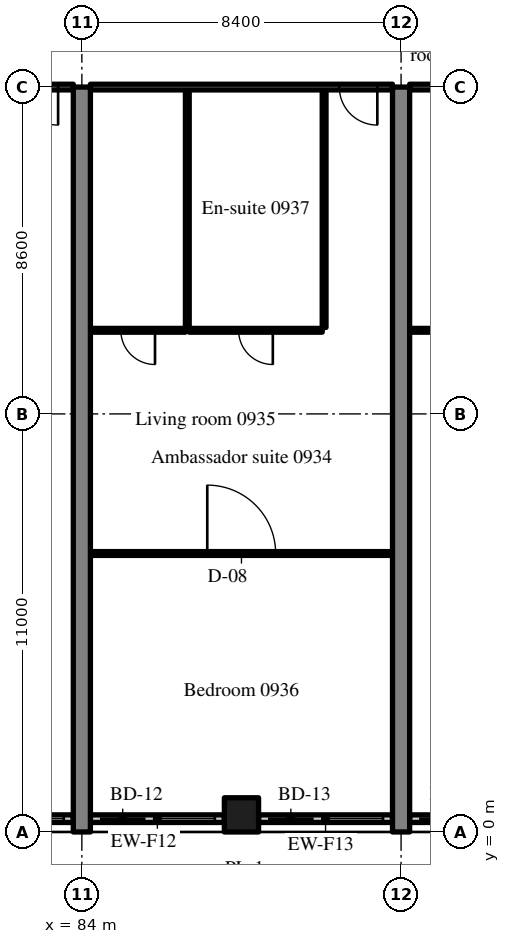
"""IFC4 building model, lengths in metres.
Left out: names, types, materials, properties, quantities, classifications, styles, units other than length and angle.
Written with IfcOpenShell. Run it as: python <this file> out.ifc"""

import sys

from ifc_helpers import new_model, si_unit, direction, frame, frame_2d, origin, origin_2d, place, context, subcontext, project, spatial, rectangle, extrude, source, transform, mapped, element, fill, save


model = new_model("IFC4")
c1 = context("Model", 3, precision=1e-05, world=origin(), true_north=direction((0.0, 1.0)))
c2 = subcontext(c1, "Body", "Model", "MODEL_VIEW")
j1 = project(units=[si_unit("LENGTHUNIT", "METRE"), si_unit("PLANEANGLEUNIT", "RADIAN")], contexts=[c1])
p1 = place(None, origin())
s1 = spatial("IfcSite", under=j1, at=p1, CompositionType="ELEMENT")
p2 = place(p1, origin())
s2 = spatial("IfcBuilding", under=s1, at=p2, CompositionType="ELEMENT")
p3 = place(p2, frame((0.0, 0.0, 43.0)))
s3 = spatial("IfcBuildingStorey", under=s2, at=p3, CompositionType="ELEMENT", Elevation=43.0)
m1 = source(origin(), c2, "Body", "SweptSolid", [
    extrude(rectangle(XDim=19.6, YDim=0.45, at=frame_2d((9.8, 0.0))), origin(), (0.0, 0.0, 1.0), 3.52),
])
for number, where, z_axis, x_axis in (
    (1, (84.0, 0.0, 0.0), (0.0, 0.0, 1.0), (0.0, 1.0, 0.0)),
    (2, (92.4, 0.0, 0.0), (0.0, 0.0, 1.0), (0.0, 1.0, 0.0)),
):
    element("IfcWall", number, at=place(p3, frame(where, z_axis=z_axis, x_axis=x_axis)), inside=s3, PredefinedType="SHEAR", context=c2, shape_type="MappedRepresentation", body=[
        mapped(m1, transform((0.0, 0.0, 0.0), scale=1.0)),
    ])
m2 = source(origin(), c2, "Body", "SweptSolid", [
    extrude(rectangle(XDim=0.9, YDim=0.9, at=origin_2d()), origin(), (0.0, 0.0, 1.0), 3.52),
])
p4 = place(p3, frame((88.2, 0.45, 0.0), z_axis=(0.0, 0.0, 1.0), x_axis=(1.0, 0.0, 0.0)))
e3 = element("IfcColumn", 3, at=p4, inside=s3, PredefinedType="COLUMN", context=c2, shape_type="MappedRepresentation", body=[
    mapped(m2, transform((0.0, 0.0, 0.0), scale=1.0)),
])
m3 = source(origin(), c2, "Body", "SweptSolid", [
    extrude(rectangle(XDim=3.525, YDim=0.2, at=frame_2d((1.762, 0.0))), origin(), (0.0, 0.0, 1.0), 2.82),
])
p5 = place(p3, frame((80.25, 0.35, 0.0), z_axis=(0.0, 0.0, 1.0), x_axis=(1.0, 0.0, 0.0)))
e4 = element("IfcWall", 4, at=p5, inside=s3, PredefinedType="SOLIDWALL", context=c2, shape_type="MappedRepresentation", body=[
    mapped(m3, transform((0.0, 0.0, 0.0), scale=1.0)),
])
m4 = source(origin(), c2, "Body", "SweptSolid", [
    extrude(rectangle(XDim=1.2, YDim=2.4, at=frame_2d((0.6, 1.2))), frame((0.0, 0.11, 0.0), z_axis=(0.0, -1.0, 0.0), x_axis=(1.0, 0.0, 0.0)), (0.0, 0.0, 1.0), 0.22),
])
p6 = place(p5, frame((0.25, 0.0, 0.0)))
e5 = element("IfcOpeningElement", 5, at=p6, cuts=e4, PredefinedType="OPENING", context=c2, shape_type="MappedRepresentation", body=[
    mapped(m4, transform((0.0, 0.0, 0.0), scale=1.0)),
])
m5 = source(origin(), c2, "Body", "SweptSolid", [
    extrude(rectangle(XDim=1.5, YDim=1.5, at=frame_2d((0.75, 0.75))), frame((0.0, 0.11, 0.0), z_axis=(0.0, -1.0, 0.0), x_axis=(1.0, 0.0, 0.0)), (0.0, 0.0, 1.0), 0.22),
])
p7 = place(p5, frame((1.775, 0.0, 0.9)))
e6 = element("IfcOpeningElement", 6, at=p7, cuts=e4, PredefinedType="OPENING", context=c2, shape_type="MappedRepresentation", body=[
    mapped(m5, transform((0.0, 0.0, 0.0), scale=1.0)),
])
p8 = place(p3, frame((84.225, 0.35, 0.0), z_axis=(0.0, 0.0, 1.0), x_axis=(1.0, 0.0, 0.0)))
e7 = element("IfcWall", 7, at=p8, inside=s3, PredefinedType="SOLIDWALL", context=c2, shape_type="MappedRepresentation", body=[
    mapped(m3, transform((0.0, 0.0, 0.0), scale=1.0)),
])
p9 = place(p8, frame((0.25, 0.0, 0.0)))
e8 = element("IfcOpeningElement", 8, at=p9, cuts=e7, PredefinedType="OPENING", context=c2, shape_type="MappedRepresentation", body=[
    mapped(m4, transform((0.0, 0.0, 0.0), scale=1.0)),
])
p10 = place(p8, frame((1.775, 0.0, 0.9)))
e9 = element("IfcOpeningElement", 9, at=p10, cuts=e7, PredefinedType="OPENING", context=c2, shape_type="MappedRepresentation", body=[
    mapped(m5, transform((0.0, 0.0, 0.0), scale=1.0)),
])
m6 = source(origin(), c2, "Body", "SweptSolid", [
    extrude(rectangle(XDim=3.525, YDim=0.2, at=frame_2d((1.763, 0.0))), origin(), (0.0, 0.0, 1.0), 2.82),
])
p11 = place(p3, frame((88.65, 0.35, 0.0), z_axis=(0.0, 0.0, 1.0), x_axis=(1.0, 0.0, 0.0)))
e10 = element("IfcWall", 10, at=p11, inside=s3, PredefinedType="SOLIDWALL", context=c2, shape_type="MappedRepresentation", body=[
    mapped(m6, transform((0.0, 0.0, 0.0), scale=1.0)),
])
p12 = place(p11, frame((0.25, 0.0, 0.0)))
e11 = element("IfcOpeningElement", 11, at=p12, cuts=e10, PredefinedType="OPENING", context=c2, shape_type="MappedRepresentation", body=[
    mapped(m4, transform((0.0, 0.0, 0.0), scale=1.0)),
])
p13 = place(p11, frame((1.775, 0.0, 0.9)))
e12 = element("IfcOpeningElement", 12, at=p13, cuts=e10, PredefinedType="OPENING", context=c2, shape_type="MappedRepresentation", body=[
    mapped(m5, transform((0.0, 0.0, 0.0), scale=1.0)),
])
m7 = source(origin(), c2, "Body", "SweptSolid", [
    extrude(rectangle(XDim=4.03, YDim=0.2, at=frame_2d((2.015, 0.0))), origin(), (0.0, 0.0, 1.0), 2.82),
])
p14 = place(p3, frame((92.625, 0.35, 0.0), z_axis=(0.0, 0.0, 1.0), x_axis=(1.0, 0.0, 0.0)))
e13 = element("IfcWall", 13, at=p14, inside=s3, PredefinedType="SOLIDWALL", context=c2, shape_type="MappedRepresentation", body=[
    mapped(m7, transform((0.0, 0.0, 0.0), scale=1.0)),
])
p15 = place(p14, frame((0.25, 0.0, 0.0)))
e14 = element("IfcOpeningElement", 14, at=p15, cuts=e13, PredefinedType="OPENING", context=c2, shape_type="MappedRepresentation", body=[
    mapped(m4, transform((0.0, 0.0, 0.0), scale=1.0)),
])
p16 = place(p14, frame((2.28, 0.0, 0.9)))
e15 = element("IfcOpeningElement", 15, at=p16, cuts=e13, PredefinedType="OPENING", context=c2, shape_type="MappedRepresentation", body=[
    mapped(m5, transform((0.0, 0.0, 0.0), scale=1.0)),
])
m8 = source(origin(), c2, "Body", "SweptSolid", [
    extrude(rectangle(XDim=3.9, YDim=0.15, at=frame_2d((1.95, 0.0))), origin(), (0.0, 0.0, 1.0), 2.82),
])
p17 = place(p3, frame((79.875, 19.6, 0.0), z_axis=(0.0, 0.0, 1.0), x_axis=(1.0, 0.0, 0.0)))
e16 = element("IfcWall", 16, at=p17, inside=s3, PredefinedType="PARTITIONING", context=c2, shape_type="MappedRepresentation", body=[
    mapped(m8, transform((0.0, 0.0, 0.0), scale=1.0)),
])
m9 = source(origin(), c2, "Body", "SweptSolid", [
    extrude(rectangle(XDim=1.0, YDim=2.1, at=frame_2d((0.5, 1.05))), frame((0.0, 0.085, 0.0), z_axis=(0.0, -1.0, 0.0), x_axis=(1.0, 0.0, 0.0)), (0.0, 0.0, 1.0), 0.17),
])
p18 = place(p17, frame((2.5, 0.0, 0.0)))
e17 = element("IfcOpeningElement", 17, at=p18, cuts=e16, PredefinedType="OPENING", context=c2, shape_type="MappedRepresentation", body=[
    mapped(m9, transform((0.0, 0.0, 0.0), scale=1.0)),
])
m10 = source(origin(), c2, "Body", "SweptSolid", [
    extrude(rectangle(XDim=6.25, YDim=0.1, at=frame_2d((3.125, 0.0))), origin(), (0.0, 0.0, 1.0), 3.52),
])
for number, where, z_axis, x_axis in (
    (18, (90.375, 13.275, 0.0), (0.0, 0.0, 1.0), (0.0, 1.0, 0.0)),
    (19, (86.775, 13.275, 0.0), (0.0, 0.0, 1.0), (0.0, 1.0, 0.0)),
):
    element("IfcWall", number, at=place(p3, frame(where, z_axis=z_axis, x_axis=x_axis)), inside=s3, PredefinedType="PARTITIONING", context=c2, shape_type="MappedRepresentation", body=[
        mapped(m10, transform((0.0, 0.0, 0.0), scale=1.0)),
    ])
m11 = source(origin(), c2, "Body", "SweptSolid", [
    extrude(rectangle(XDim=3.5, YDim=0.1, at=frame_2d((1.75, 0.0))), origin(), (0.0, 0.0, 1.0), 3.52),
])
p19 = place(p3, frame((86.825, 13.2, 0.0), z_axis=(0.0, 0.0, 1.0), x_axis=(1.0, 0.0, 0.0)))
e20 = element("IfcWall", 20, at=p19, inside=s3, PredefinedType="PARTITIONING", context=c2, shape_type="MappedRepresentation", body=[
    mapped(m11, transform((0.0, 0.0, 0.0), scale=1.0)),
])
m12 = source(origin(), c2, "Body", "SweptSolid", [
    extrude(rectangle(XDim=0.9, YDim=2.1, at=frame_2d((0.45, 1.05))), frame((0.0, 0.06, 0.0), z_axis=(0.0, -1.0, 0.0), x_axis=(1.0, 0.0, 0.0)), (0.0, 0.0, 1.0), 0.12),
])
p20 = place(p19, frame((1.3, 0.0, 0.0)))
e21 = element("IfcOpeningElement", 21, at=p20, cuts=e20, PredefinedType="OPENING", context=c2, shape_type="MappedRepresentation", body=[
    mapped(m12, transform((0.0, 0.0, 0.0), scale=1.0)),
])
m13 = source(origin(), c2, "Body", "SweptSolid", [
    extrude(rectangle(XDim=2.5, YDim=0.1, at=frame_2d((1.25, 0.0))), origin(), (0.0, 0.0, 1.0), 3.52),
])
p21 = place(p3, frame((84.225, 13.2, 0.0), z_axis=(0.0, 0.0, 1.0), x_axis=(1.0, 0.0, 0.0)))
e22 = element("IfcWall", 22, at=p21, inside=s3, PredefinedType="PARTITIONING", context=c2, shape_type="MappedRepresentation", body=[
    mapped(m13, transform((0.0, 0.0, 0.0), scale=1.0)),
])
p22 = place(p21, frame((0.8, 0.0, 0.0)))
e23 = element("IfcOpeningElement", 23, at=p22, cuts=e22, PredefinedType="OPENING", context=c2, shape_type="MappedRepresentation", body=[
    mapped(m12, transform((0.0, 0.0, 0.0), scale=1.0)),
])
m14 = source(origin(), c2, "Body", "SweptSolid", [
    extrude(rectangle(XDim=7.95, YDim=0.1, at=frame_2d((3.975, 0.0))), origin(), (0.0, 0.0, 1.0), 3.52),
])
p23 = place(p3, frame((84.225, 7.327, 0.0), z_axis=(0.0, 0.0, 1.0), x_axis=(1.0, 0.0, 0.0)))
e24 = element("IfcWall", 24, at=p23, inside=s3, PredefinedType="PARTITIONING", context=c2, shape_type="MappedRepresentation", body=[
    mapped(m14, transform((0.0, 0.0, 0.0), scale=1.0)),
])
m15 = source(origin(), c2, "Body", "SweptSolid", [
    extrude(rectangle(XDim=1.8, YDim=2.1, at=frame_2d((0.9, 1.05))), frame((0.0, 0.06, 0.0), z_axis=(0.0, -1.0, 0.0), x_axis=(1.0, 0.0, 0.0)), (0.0, 0.0, 1.0), 0.12),
])
p24 = place(p23, frame((3.075, 0.0, 0.0)))
e25 = element("IfcOpeningElement", 25, at=p24, cuts=e24, PredefinedType="OPENING", context=c2, shape_type="MappedRepresentation", body=[
    mapped(m15, transform((0.0, 0.0, 0.0), scale=1.0)),
])
m16 = source(origin(), c2, "Body", "SweptSolid", [
    extrude(rectangle(XDim=7.95, YDim=0.15, at=frame_2d((3.975, 0.0))), origin(), (0.0, 0.0, 1.0), 2.82),
])
p25 = place(p3, frame((84.225, 19.6, 0.0), z_axis=(0.0, 0.0, 1.0), x_axis=(1.0, 0.0, 0.0)))
e26 = element("IfcWall", 26, at=p25, inside=s3, PredefinedType="PARTITIONING", context=c2, shape_type="MappedRepresentation", body=[
    mapped(m16, transform((0.0, 0.0, 0.0), scale=1.0)),
])
p26 = place(p25, frame((6.55, 0.0, 0.0)))
e27 = element("IfcOpeningElement", 27, at=p26, cuts=e26, PredefinedType="OPENING", context=c2, shape_type="MappedRepresentation", body=[
    mapped(m9, transform((0.0, 0.0, 0.0), scale=1.0)),
])
m17 = source(origin(), c2, "Body", "SweptSolid", [
    extrude(rectangle(XDim=2.275, YDim=0.1, at=frame_2d((1.137, 0.0))), origin(), (0.0, 0.0, 1.0), 3.52),
])
p27 = place(p3, frame((92.625, 13.2, 0.0), z_axis=(0.0, 0.0, 1.0), x_axis=(1.0, 0.0, 0.0)))
e28 = element("IfcWall", 28, at=p27, inside=s3, PredefinedType="PARTITIONING", context=c2, shape_type="MappedRepresentation", body=[
    mapped(m17, transform((0.0, 0.0, 0.0), scale=1.0)),
])
p28 = place(p27, frame((0.688, 0.0, 0.0)))
e29 = element("IfcOpeningElement", 29, at=p28, cuts=e28, PredefinedType="OPENING", context=c2, shape_type="MappedRepresentation", body=[
    mapped(m12, transform((0.0, 0.0, 0.0), scale=1.0)),
])
m18 = source(origin(), c2, "Body", "SweptSolid", [
    extrude(rectangle(XDim=7.725, YDim=0.15, at=frame_2d((3.863, 0.0))), origin(), (0.0, 0.0, 1.0), 2.82),
])
p29 = place(p3, frame((92.625, 19.6, 0.0), z_axis=(0.0, 0.0, 1.0), x_axis=(1.0, 0.0, 0.0)))
e30 = element("IfcWall", 30, at=p29, inside=s3, PredefinedType="PARTITIONING", context=c2, shape_type="MappedRepresentation", body=[
    mapped(m18, transform((0.0, 0.0, 0.0), scale=1.0)),
])
p30 = place(p29, frame((6.325, 0.0, 0.0)))
e31 = element("IfcOpeningElement", 31, at=p30, cuts=e30, PredefinedType="OPENING", context=c2, shape_type="MappedRepresentation", body=[
    mapped(m9, transform((0.0, 0.0, 0.0), scale=1.0)),
])
m19 = source(origin(), c2, "Body", "SweptSolid", [
    extrude(rectangle(XDim=1.5, YDim=1.5, at=frame_2d((0.75, 0.75))), frame((0.0, 0.03, 0.0), z_axis=(0.0, -1.0, 0.0), x_axis=(1.0, 0.0, 0.0)), (0.0, 0.0, 1.0), 0.06),
])
p31 = place(p7, origin())
e32 = element("IfcWindow", 32, at=p31, inside=s3, PartitioningType="SINGLE_PANEL", PredefinedType="WINDOW", context=c2, shape_type="MappedRepresentation", body=[
    mapped(m19, transform((0.0, 0.0, 0.0), scale=1.0)),
])
fill(e6, e32)
m20 = source(origin(), c2, "Body", "SweptSolid", [
    extrude(rectangle(XDim=1.2, YDim=2.4, at=frame_2d((0.6, 1.2))), frame((0.0, 0.025, 0.0), z_axis=(0.0, -1.0, 0.0), x_axis=(1.0, 0.0, 0.0)), (0.0, 0.0, 1.0), 0.05),
])
p32 = place(p9, origin())
e33 = element("IfcDoor", 33, at=p32, inside=s3, OperationType="SLIDING_TO_RIGHT", PredefinedType="DOOR", context=c2, shape_type="MappedRepresentation", body=[
    mapped(m20, transform((0.0, 0.0, 0.0), scale=1.0)),
])
fill(e8, e33)
p33 = place(p10, origin())
e34 = element("IfcWindow", 34, at=p33, inside=s3, PartitioningType="SINGLE_PANEL", PredefinedType="WINDOW", context=c2, shape_type="MappedRepresentation", body=[
    mapped(m19, transform((0.0, 0.0, 0.0), scale=1.0)),
])
fill(e9, e34)
p34 = place(p12, origin())
e35 = element("IfcDoor", 35, at=p34, inside=s3, OperationType="SLIDING_TO_LEFT", PredefinedType="DOOR", context=c2, shape_type="MappedRepresentation", body=[
    mapped(m20, transform((0.0, 0.0, 0.0), scale=1.0)),
])
fill(e11, e35)
p35 = place(p13, origin())
e36 = element("IfcWindow", 36, at=p35, inside=s3, PartitioningType="SINGLE_PANEL", PredefinedType="WINDOW", context=c2, shape_type="MappedRepresentation", body=[
    mapped(m19, transform((0.0, 0.0, 0.0), scale=1.0)),
])
fill(e12, e36)
p36 = place(p15, origin())
e37 = element("IfcDoor", 37, at=p36, inside=s3, OperationType="SLIDING_TO_RIGHT", PredefinedType="DOOR", context=c2, shape_type="MappedRepresentation", body=[
    mapped(m20, transform((0.0, 0.0, 0.0), scale=1.0)),
])
fill(e14, e37)
m21 = source(origin(), c2, "Body", "SweptSolid", [
    extrude(rectangle(XDim=1.0, YDim=2.1, at=frame_2d((0.5, 1.05))), frame((0.0, 0.025, 0.0), z_axis=(0.0, -1.0, 0.0), x_axis=(1.0, 0.0, 0.0)), (0.0, 0.0, 1.0), 0.05),
])
p37 = place(p18, origin())
e38 = element("IfcDoor", 38, at=p37, inside=s3, OperationType="SINGLE_SWING_RIGHT", PredefinedType="DOOR", context=c2, shape_type="MappedRepresentation", body=[
    mapped(m21, transform((0.0, 0.0, 0.0), scale=1.0)),
])
fill(e17, e38)
m22 = source(origin(), c2, "Body", "SweptSolid", [
    extrude(rectangle(XDim=0.9, YDim=2.1, at=frame_2d((0.45, 1.05))), frame((0.0, 0.025, 0.0), z_axis=(0.0, -1.0, 0.0), x_axis=(1.0, 0.0, 0.0)), (0.0, 0.0, 1.0), 0.05),
])
p38 = place(p20, origin())
e39 = element("IfcDoor", 39, at=p38, inside=s3, OperationType="SINGLE_SWING_RIGHT", PredefinedType="DOOR", context=c2, shape_type="MappedRepresentation", body=[
    mapped(m22, transform((0.0, 0.0, 0.0), scale=1.0)),
])
fill(e21, e39)
p39 = place(p22, origin())
e40 = element("IfcDoor", 40, at=p39, inside=s3, OperationType="SINGLE_SWING_RIGHT", PredefinedType="DOOR", context=c2, shape_type="MappedRepresentation", body=[
    mapped(m22, transform((0.0, 0.0, 0.0), scale=1.0)),
])
fill(e23, e40)
m23 = source(origin(), c2, "Body", "SweptSolid", [
    extrude(rectangle(XDim=1.8, YDim=2.1, at=frame_2d((0.9, 1.05))), frame((0.0, 0.025, 0.0), z_axis=(0.0, -1.0, 0.0), x_axis=(1.0, 0.0, 0.0)), (0.0, 0.0, 1.0), 0.05),
])
p40 = place(p24, origin())
e41 = element("IfcDoor", 41, at=p40, inside=s3, OperationType="DOUBLE_DOOR_SINGLE_SWING", PredefinedType="DOOR", context=c2, shape_type="MappedRepresentation", body=[
    mapped(m23, transform((0.0, 0.0, 0.0), scale=1.0)),
])
fill(e25, e41)
p41 = place(p26, origin())
e42 = element("IfcDoor", 42, at=p41, inside=s3, OperationType="SINGLE_SWING_RIGHT", PredefinedType="DOOR", context=c2, shape_type="MappedRepresentation", body=[
    mapped(m21, transform((0.0, 0.0, 0.0), scale=1.0)),
])
fill(e27, e42)
save(model, sys.argv[1])
